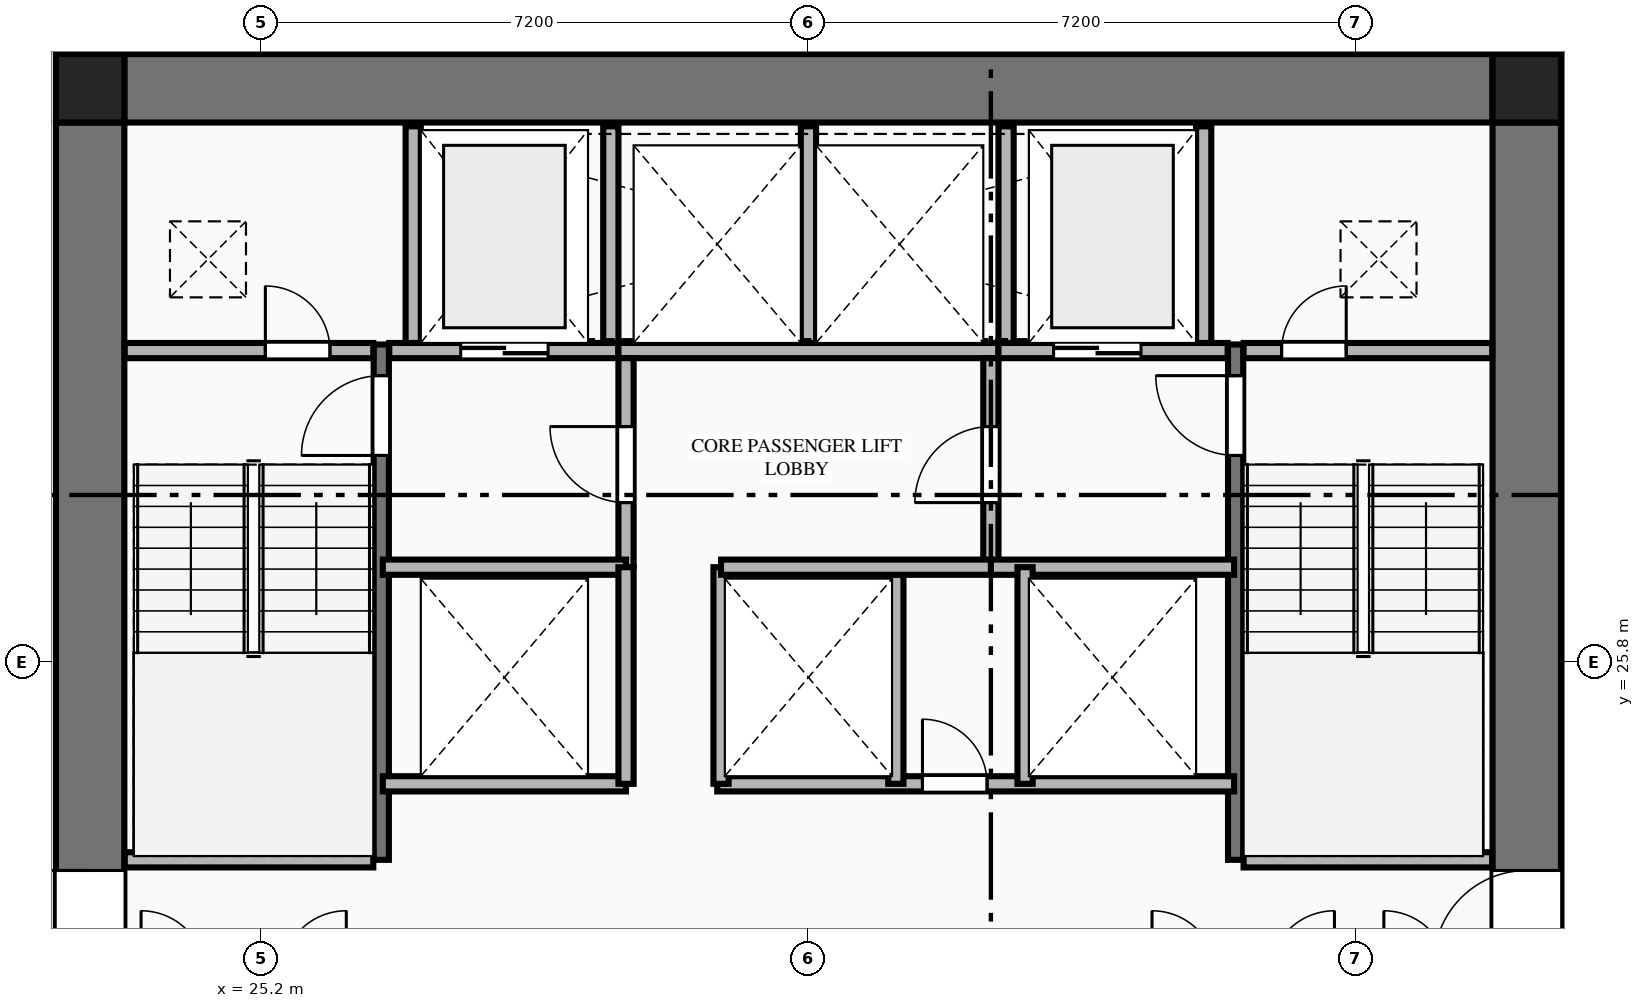
"""IFC4 building model, lengths in metres.
Left out: names, types, materials, properties, quantities, classifications, styles, units other than length and angle.
Written with IfcOpenShell. Run it as: python <this file> out.ifc"""

import sys

from ifc_helpers import new_model, si_unit, direction, frame, frame_2d, origin, origin_2d, place, context, subcontext, project, spatial, rectangle, extrude, element, fill, save


model = new_model("IFC4")
c1 = context("Model", 3, precision=1e-05, world=origin(), true_north=direction((0.0, 1.0)))
c2 = subcontext(c1, "Body", "Model", "MODEL_VIEW")
j1 = project(units=[si_unit("LENGTHUNIT", "METRE"), si_unit("PLANEANGLEUNIT", "RADIAN")], contexts=[c1])
p1 = place(None, origin())
s1 = spatial("IfcSite", under=j1, at=p1, CompositionType="ELEMENT")
p2 = place(p1, origin())
s2 = spatial("IfcBuilding", under=s1, at=p2, CompositionType="ELEMENT")
p3 = place(p2, frame((0.0, 0.0, 56.85)))
s3 = spatial("IfcBuildingStorey", under=s2, at=p3, CompositionType="ELEMENT", Elevation=56.85)
for number, where, z_axis, x_axis in (
    (1, (41.85, 33.35, 0.0), (0.0, 0.0, 1.0), (1.0, 0.0, 0.0)),
    (2, (22.95, 33.35, 0.0), (0.0, 0.0, 1.0), (1.0, 0.0, 0.0)),
):
    element("IfcColumn", number, at=place(p3, frame(where, z_axis=z_axis, x_axis=x_axis)), inside=s3, PredefinedType="COLUMN", context=c2, shape_type="SweptSolid", body=[
        extrude(rectangle(XDim=0.9, YDim=0.9, at=origin_2d()), origin(), (0.0, 0.0, 1.0), 3.55),
    ])
p4 = place(p3, frame((23.4, 33.35, 0.0), z_axis=(0.0, 0.0, 1.0), x_axis=(1.0, 0.0, 0.0)))
e3 = element("IfcWall", 3, at=p4, inside=s3, PredefinedType="SHEAR", context=c2, shape_type="SweptSolid", body=[
    extrude(rectangle(XDim=18.0, YDim=0.9, at=frame_2d((9.0, 0.0))), origin(), (0.0, 0.0, 1.0), 3.33),
])
p5 = place(p3, frame((22.95, 18.9, 0.0), z_axis=(0.0, 0.0, 1.0), x_axis=(0.0, 1.0, 0.0)))
e4 = element("IfcWall", 4, at=p5, inside=s3, PredefinedType="SHEAR", context=c2, shape_type="SweptSolid", body=[
    extrude(rectangle(XDim=14.0, YDim=0.9, at=frame_2d((7.0, 0.0))), origin(), (0.0, 0.0, 1.0), 3.33),
])
p6 = place(p5, frame((2.94, 0.0, 0.0)))
e5 = element("IfcOpeningElement", 5, at=p6, cuts=e4, PredefinedType="OPENING", context=c2, shape_type="SweptSolid", body=[
    extrude(rectangle(XDim=1.22, YDim=2.25, at=frame_2d((0.61, 1.125))), frame((0.0, 0.46, 0.0), z_axis=(0.0, -1.0, 0.0), x_axis=(1.0, 0.0, 0.0)), (0.0, 0.0, 1.0), 0.92),
])
p7 = place(p3, frame((41.85, 18.9, 0.0), z_axis=(0.0, 0.0, 1.0), x_axis=(0.0, 1.0, 0.0)))
e6 = element("IfcWall", 6, at=p7, inside=s3, PredefinedType="SHEAR", context=c2, shape_type="SweptSolid", body=[
    extrude(rectangle(XDim=14.0, YDim=0.9, at=frame_2d((7.0, 0.0))), origin(), (0.0, 0.0, 1.0), 3.33),
])
p8 = place(p7, frame((2.94, 0.0, 0.0)))
e7 = element("IfcOpeningElement", 7, at=p8, cuts=e6, PredefinedType="OPENING", context=c2, shape_type="SweptSolid", body=[
    extrude(rectangle(XDim=1.22, YDim=2.25, at=frame_2d((0.61, 1.125))), frame((0.0, 0.46, 0.0), z_axis=(0.0, -1.0, 0.0), x_axis=(1.0, 0.0, 0.0)), (0.0, 0.0, 1.0), 0.92),
])
p9 = place(p3, frame((26.78, 23.2, 0.0), z_axis=(0.0, 0.0, 1.0), x_axis=(0.0, 1.0, 0.0)))
e8 = element("IfcWall", 8, at=p9, inside=s3, PredefinedType="SHEAR", context=c2, shape_type="SweptSolid", body=[
    extrude(rectangle(XDim=6.78, YDim=0.2, at=frame_2d((3.39, 0.0))), origin(), (0.0, 0.0, 1.0), 3.55),
])
p10 = place(p9, frame((5.32, 0.0, 0.0)))
e9 = element("IfcOpeningElement", 9, at=p10, cuts=e8, PredefinedType="OPENING", context=c2, shape_type="SweptSolid", body=[
    extrude(rectangle(XDim=1.05, YDim=2.15, at=frame_2d((0.525, 1.075))), frame((0.0, 0.11, 0.0), z_axis=(0.0, -1.0, 0.0), x_axis=(1.0, 0.0, 0.0)), (0.0, 0.0, 1.0), 0.22),
])
p11 = place(p3, frame((23.405, 23.2, 0.0), z_axis=(0.0, 0.0, 1.0), x_axis=(1.0, 0.0, 0.0)))
e10 = element("IfcWall", 10, at=p11, inside=s3, PredefinedType="PLUMBINGWALL", context=c2, shape_type="SweptSolid", body=[
    extrude(rectangle(XDim=3.27, YDim=0.2, at=frame_2d((1.635, 0.0))), origin(), (0.0, 0.0, 1.0), 3.33),
])
p12 = place(p3, frame((38.02, 23.2, 0.0), z_axis=(0.0, 0.0, 1.0), x_axis=(0.0, 1.0, 0.0)))
e11 = element("IfcWall", 11, at=p12, inside=s3, PredefinedType="SHEAR", context=c2, shape_type="SweptSolid", body=[
    extrude(rectangle(XDim=6.78, YDim=0.2, at=frame_2d((3.39, 0.0))), origin(), (0.0, 0.0, 1.0), 3.55),
])
p13 = place(p12, frame((5.32, 0.0, 0.0)))
e12 = element("IfcOpeningElement", 12, at=p13, cuts=e11, PredefinedType="OPENING", context=c2, shape_type="SweptSolid", body=[
    extrude(rectangle(XDim=1.05, YDim=2.15, at=frame_2d((0.525, 1.075))), frame((0.0, 0.11, 0.0), z_axis=(0.0, -1.0, 0.0), x_axis=(1.0, 0.0, 0.0)), (0.0, 0.0, 1.0), 0.22),
])
p14 = place(p3, frame((38.125, 23.2, 0.0), z_axis=(0.0, 0.0, 1.0), x_axis=(1.0, 0.0, 0.0)))
e13 = element("IfcWall", 13, at=p14, inside=s3, PredefinedType="PLUMBINGWALL", context=c2, shape_type="SweptSolid", body=[
    extrude(rectangle(XDim=3.27, YDim=0.2, at=frame_2d((1.635, 0.0))), origin(), (0.0, 0.0, 1.0), 3.33),
])
p15 = place(p3, frame((23.405, 29.9, 0.0), z_axis=(0.0, 0.0, 1.0), x_axis=(1.0, 0.0, 0.0)))
e14 = element("IfcWall", 14, at=p15, inside=s3, PredefinedType="PLUMBINGWALL", context=c2, shape_type="SweptSolid", body=[
    extrude(rectangle(XDim=3.27, YDim=0.2, at=frame_2d((1.635, 0.0))), origin(), (0.0, 0.0, 1.0), 3.33),
])
p16 = place(p15, frame((1.85, 0.0, 0.0)))
e15 = element("IfcOpeningElement", 15, at=p16, cuts=e14, PredefinedType="OPENING", context=c2, shape_type="SweptSolid", body=[
    extrude(rectangle(XDim=0.85, YDim=2.05, at=frame_2d((0.425, 1.025))), frame((0.0, 0.11, 0.0), z_axis=(0.0, -1.0, 0.0), x_axis=(1.0, 0.0, 0.0)), (0.0, 0.0, 1.0), 0.22),
])
p17 = place(p3, frame((26.885, 29.9, 0.0), z_axis=(0.0, 0.0, 1.0), x_axis=(1.0, 0.0, 0.0)))
e16 = element("IfcWall", 16, at=p17, inside=s3, PredefinedType="PLUMBINGWALL", context=c2, shape_type="SweptSolid", body=[
    extrude(rectangle(XDim=3.015, YDim=0.2, at=frame_2d((1.507, 0.0))), origin(), (0.0, 0.0, 1.0), 3.33),
])
p18 = place(p17, frame((0.94, 0.0, 0.0)))
e17 = element("IfcOpeningElement", 17, at=p18, cuts=e16, PredefinedType="OPENING", context=c2, shape_type="SweptSolid", body=[
    extrude(rectangle(XDim=1.15, YDim=2.2, at=frame_2d((0.575, 1.1))), frame((0.0, 0.11, 0.0), z_axis=(0.0, -1.0, 0.0), x_axis=(1.0, 0.0, 0.0)), (0.0, 0.0, 1.0), 0.22),
])
p19 = place(p3, frame((29.9, 29.9, 0.0), z_axis=(0.0, 0.0, 1.0), x_axis=(1.0, 0.0, 0.0)))
e18 = element("IfcWall", 18, at=p19, inside=s3, PredefinedType="PLUMBINGWALL", context=c2, shape_type="SweptSolid", body=[
    extrude(rectangle(XDim=5.0, YDim=0.2, at=frame_2d((2.5, 0.0))), origin(), (0.0, 0.0, 1.0), 3.33),
])
p20 = place(p3, frame((34.9, 29.9, 0.0), z_axis=(0.0, 0.0, 1.0), x_axis=(1.0, 0.0, 0.0)))
e19 = element("IfcWall", 19, at=p20, inside=s3, PredefinedType="PLUMBINGWALL", context=c2, shape_type="SweptSolid", body=[
    extrude(rectangle(XDim=3.015, YDim=0.2, at=frame_2d((1.508, 0.0))), origin(), (0.0, 0.0, 1.0), 3.33),
])
p21 = place(p20, frame((0.725, 0.0, 0.0)))
e20 = element("IfcOpeningElement", 20, at=p21, cuts=e19, PredefinedType="OPENING", context=c2, shape_type="SweptSolid", body=[
    extrude(rectangle(XDim=1.15, YDim=2.2, at=frame_2d((0.575, 1.1))), frame((0.0, 0.11, 0.0), z_axis=(0.0, -1.0, 0.0), x_axis=(1.0, 0.0, 0.0)), (0.0, 0.0, 1.0), 0.22),
])
p22 = place(p3, frame((38.125, 29.9, 0.0), z_axis=(0.0, 0.0, 1.0), x_axis=(1.0, 0.0, 0.0)))
e21 = element("IfcWall", 21, at=p22, inside=s3, PredefinedType="PLUMBINGWALL", context=c2, shape_type="SweptSolid", body=[
    extrude(rectangle(XDim=3.27, YDim=0.2, at=frame_2d((1.635, 0.0))), origin(), (0.0, 0.0, 1.0), 3.33),
])
p23 = place(p22, frame((0.5, 0.0, 0.0)))
e22 = element("IfcOpeningElement", 22, at=p23, cuts=e21, PredefinedType="OPENING", context=c2, shape_type="SweptSolid", body=[
    extrude(rectangle(XDim=0.85, YDim=2.05, at=frame_2d((0.425, 1.025))), frame((0.0, 0.11, 0.0), z_axis=(0.0, -1.0, 0.0), x_axis=(1.0, 0.0, 0.0)), (0.0, 0.0, 1.0), 0.22),
])
for number, where, z_axis, x_axis in (
    (23, (27.2, 30.0, 0.0), (0.0, 0.0, 1.0), (0.0, 1.0, 0.0)),
    (24, (29.8, 30.0, 0.0), (0.0, 0.0, 1.0), (0.0, 1.0, 0.0)),
    (25, (32.4, 30.0, 0.0), (0.0, 0.0, 1.0), (0.0, 1.0, 0.0)),
    (26, (35.0, 30.0, 0.0), (0.0, 0.0, 1.0), (0.0, 1.0, 0.0)),
    (27, (37.6, 30.0, 0.0), (0.0, 0.0, 1.0), (0.0, 1.0, 0.0)),
):
    element("IfcWall", number, at=place(p3, frame(where, z_axis=z_axis, x_axis=x_axis)), inside=s3, PredefinedType="PLUMBINGWALL", context=c2, shape_type="SweptSolid", body=[
        extrude(rectangle(XDim=2.85, YDim=0.2, at=frame_2d((1.425, 0.0))), origin(), (0.0, 0.0, 1.0), 3.33),
    ])
p24 = place(p3, frame((30.0, 27.05, 0.0), z_axis=(0.0, 0.0, 1.0), x_axis=(0.0, 1.0, 0.0)))
e28 = element("IfcWall", 28, at=p24, inside=s3, PredefinedType="PLUMBINGWALL", context=c2, shape_type="SweptSolid", body=[
    extrude(rectangle(XDim=2.75, YDim=0.2, at=frame_2d((1.375, 0.0))), origin(), (0.0, 0.0, 1.0), 3.33),
])
p25 = place(p24, frame((0.85, 0.0, 0.0)))
e29 = element("IfcOpeningElement", 29, at=p25, cuts=e28, PredefinedType="OPENING", context=c2, shape_type="SweptSolid", body=[
    extrude(rectangle(XDim=1.0, YDim=2.15, at=frame_2d((0.5, 1.075))), frame((0.0, 0.11, 0.0), z_axis=(0.0, -1.0, 0.0), x_axis=(1.0, 0.0, 0.0)), (0.0, 0.0, 1.0), 0.22),
])
p26 = place(p3, frame((26.8, 27.05, 0.0), z_axis=(0.0, 0.0, 1.0), x_axis=(1.0, 0.0, 0.0)))
e30 = element("IfcWall", 30, at=p26, inside=s3, PredefinedType="PLUMBINGWALL", context=c2, shape_type="SweptSolid", body=[
    extrude(rectangle(XDim=3.2, YDim=0.2, at=frame_2d((1.6, 0.0))), origin(), (0.0, 0.0, 1.0), 3.33),
])
p27 = place(p3, frame((34.8, 27.05, 0.0), z_axis=(0.0, 0.0, 1.0), x_axis=(0.0, 1.0, 0.0)))
e31 = element("IfcWall", 31, at=p27, inside=s3, PredefinedType="PLUMBINGWALL", context=c2, shape_type="SweptSolid", body=[
    extrude(rectangle(XDim=2.75, YDim=0.2, at=frame_2d((1.375, 0.0))), origin(), (0.0, 0.0, 1.0), 3.33),
])
p28 = place(p27, frame((0.85, 0.0, 0.0)))
e32 = element("IfcOpeningElement", 32, at=p28, cuts=e31, PredefinedType="OPENING", context=c2, shape_type="SweptSolid", body=[
    extrude(rectangle(XDim=1.0, YDim=2.15, at=frame_2d((0.5, 1.075))), frame((0.0, 0.11, 0.0), z_axis=(0.0, -1.0, 0.0), x_axis=(1.0, 0.0, 0.0)), (0.0, 0.0, 1.0), 0.22),
])
for number, where, z_axis, x_axis in (
    (33, (34.8, 27.05, 0.0), (0.0, 0.0, 1.0), (1.0, 0.0, 0.0)),
    (34, (26.8, 24.2, 0.0), (0.0, 0.0, 1.0), (1.0, 0.0, 0.0)),
):
    element("IfcWall", number, at=place(p3, frame(where, z_axis=z_axis, x_axis=x_axis)), inside=s3, PredefinedType="PLUMBINGWALL", context=c2, shape_type="SweptSolid", body=[
        extrude(rectangle(XDim=3.2, YDim=0.2, at=frame_2d((1.6, 0.0))), origin(), (0.0, 0.0, 1.0), 3.33),
    ])
p29 = place(p3, frame((30.0, 24.2, 0.0), z_axis=(0.0, 0.0, 1.0), x_axis=(0.0, 1.0, 0.0)))
e35 = element("IfcWall", 35, at=p29, inside=s3, PredefinedType="PLUMBINGWALL", context=c2, shape_type="SweptSolid", body=[
    extrude(rectangle(XDim=2.85, YDim=0.2, at=frame_2d((1.425, 0.0))), origin(), (0.0, 0.0, 1.0), 3.33),
])
p30 = place(p3, frame((31.2, 24.2, 0.0), z_axis=(0.0, 0.0, 1.0), x_axis=(1.0, 0.0, 0.0)))
e36 = element("IfcWall", 36, at=p30, inside=s3, PredefinedType="PLUMBINGWALL", context=c2, shape_type="SweptSolid", body=[
    extrude(rectangle(XDim=6.8, YDim=0.2, at=frame_2d((3.4, 0.0))), origin(), (0.0, 0.0, 1.0), 3.33),
])
p31 = place(p30, frame((2.7, 0.0, 0.0)))
e37 = element("IfcOpeningElement", 37, at=p31, cuts=e36, PredefinedType="OPENING", context=c2, shape_type="SweptSolid", body=[
    extrude(rectangle(XDim=0.85, YDim=2.05, at=frame_2d((0.425, 1.025))), frame((0.0, 0.11, 0.0), z_axis=(0.0, -1.0, 0.0), x_axis=(1.0, 0.0, 0.0)), (0.0, 0.0, 1.0), 0.22),
])
for number, where, z_axis, x_axis in (
    (38, (31.25, 24.2, 0.0), (0.0, 0.0, 1.0), (0.0, 1.0, 0.0)),
    (39, (33.55, 24.2, 0.0), (0.0, 0.0, 1.0), (0.0, 1.0, 0.0)),
    (40, (35.25, 24.2, 0.0), (0.0, 0.0, 1.0), (0.0, 1.0, 0.0)),
):
    element("IfcWall", number, at=place(p3, frame(where, z_axis=z_axis, x_axis=x_axis)), inside=s3, PredefinedType="PLUMBINGWALL", context=c2, shape_type="SweptSolid", body=[
        extrude(rectangle(XDim=2.85, YDim=0.2, at=frame_2d((1.425, 0.0))), origin(), (0.0, 0.0, 1.0), 3.33),
    ])
p32 = place(p3, frame((31.25, 27.05, 0.0), z_axis=(0.0, 0.0, 1.0), x_axis=(1.0, 0.0, 0.0)))
e41 = element("IfcWall", 41, at=p32, inside=s3, PredefinedType="PLUMBINGWALL", context=c2, shape_type="SweptSolid", body=[
    extrude(rectangle(XDim=3.55, YDim=0.2, at=frame_2d((1.775, 0.0))), origin(), (0.0, 0.0, 1.0), 3.33),
])
p33 = place(p6, origin())
e42 = element("IfcDoor", 42, at=p33, inside=s3, OperationType="SINGLE_SWING_RIGHT", PredefinedType="DOOR", context=c2, shape_type="SweptSolid", body=[
    extrude(rectangle(XDim=1.22, YDim=2.25, at=frame_2d((0.61, 1.125))), frame((0.0, 0.025, 0.0), z_axis=(0.0, -1.0, 0.0), x_axis=(1.0, 0.0, 0.0)), (0.0, 0.0, 1.0), 0.05),
])
fill(e5, e42)
p34 = place(p8, origin())
e43 = element("IfcDoor", 43, at=p34, inside=s3, OperationType="SINGLE_SWING_LEFT", PredefinedType="DOOR", context=c2, shape_type="SweptSolid", body=[
    extrude(rectangle(XDim=1.22, YDim=2.25, at=frame_2d((0.61, 1.125))), frame((0.0, 0.025, 0.0), z_axis=(0.0, -1.0, 0.0), x_axis=(1.0, 0.0, 0.0)), (0.0, 0.0, 1.0), 0.05),
])
fill(e7, e43)
p35 = place(p10, origin())
e44 = element("IfcDoor", 44, at=p35, inside=s3, OperationType="SINGLE_SWING_LEFT", PredefinedType="DOOR", context=c2, shape_type="SweptSolid", body=[
    extrude(rectangle(XDim=1.05, YDim=2.15, at=frame_2d((0.525, 1.075))), frame((0.0, 0.025, 0.0), z_axis=(0.0, -1.0, 0.0), x_axis=(1.0, 0.0, 0.0)), (0.0, 0.0, 1.0), 0.05),
])
fill(e9, e44)
p36 = place(p13, origin())
e45 = element("IfcDoor", 45, at=p36, inside=s3, OperationType="SINGLE_SWING_RIGHT", PredefinedType="DOOR", context=c2, shape_type="SweptSolid", body=[
    extrude(rectangle(XDim=1.05, YDim=2.15, at=frame_2d((0.525, 1.075))), frame((0.0, 0.025, 0.0), z_axis=(0.0, -1.0, 0.0), x_axis=(1.0, 0.0, 0.0)), (0.0, 0.0, 1.0), 0.05),
])
fill(e12, e45)
p37 = place(p16, origin())
e46 = element("IfcDoor", 46, at=p37, inside=s3, OperationType="SINGLE_SWING_LEFT", PredefinedType="DOOR", context=c2, shape_type="SweptSolid", body=[
    extrude(rectangle(XDim=0.85, YDim=2.05, at=frame_2d((0.425, 1.025))), frame((0.0, 0.025, 0.0), z_axis=(0.0, -1.0, 0.0), x_axis=(1.0, 0.0, 0.0)), (0.0, 0.0, 1.0), 0.05),
])
fill(e15, e46)
p38 = place(p23, origin())
e47 = element("IfcDoor", 47, at=p38, inside=s3, OperationType="SINGLE_SWING_RIGHT", PredefinedType="DOOR", context=c2, shape_type="SweptSolid", body=[
    extrude(rectangle(XDim=0.85, YDim=2.05, at=frame_2d((0.425, 1.025))), frame((0.0, 0.025, 0.0), z_axis=(0.0, -1.0, 0.0), x_axis=(1.0, 0.0, 0.0)), (0.0, 0.0, 1.0), 0.05),
])
fill(e22, e47)
p39 = place(p18, origin())
e48 = element("IfcDoor", 48, at=p39, inside=s3, OperationType="DOUBLE_DOOR_SLIDING", PredefinedType="DOOR", context=c2, shape_type="SweptSolid", body=[
    extrude(rectangle(XDim=1.15, YDim=2.2, at=frame_2d((0.575, 1.1))), frame((0.0, 0.025, 0.0), z_axis=(0.0, -1.0, 0.0), x_axis=(1.0, 0.0, 0.0)), (0.0, 0.0, 1.0), 0.05),
])
fill(e17, e48)
p40 = place(p21, origin())
e49 = element("IfcDoor", 49, at=p40, inside=s3, OperationType="DOUBLE_DOOR_SLIDING", PredefinedType="DOOR", context=c2, shape_type="SweptSolid", body=[
    extrude(rectangle(XDim=1.15, YDim=2.2, at=frame_2d((0.575, 1.1))), frame((0.0, 0.025, 0.0), z_axis=(0.0, -1.0, 0.0), x_axis=(1.0, 0.0, 0.0)), (0.0, 0.0, 1.0), 0.05),
])
fill(e20, e49)
p41 = place(p25, origin())
e50 = element("IfcDoor", 50, at=p41, inside=s3, OperationType="SINGLE_SWING_RIGHT", PredefinedType="DOOR", context=c2, shape_type="SweptSolid", body=[
    extrude(rectangle(XDim=1.0, YDim=2.15, at=frame_2d((0.5, 1.075))), frame((0.0, 0.025, 0.0), z_axis=(0.0, -1.0, 0.0), x_axis=(1.0, 0.0, 0.0)), (0.0, 0.0, 1.0), 0.05),
])
fill(e29, e50)
p42 = place(p28, origin())
e51 = element("IfcDoor", 51, at=p42, inside=s3, OperationType="SINGLE_SWING_LEFT", PredefinedType="DOOR", context=c2, shape_type="SweptSolid", body=[
    extrude(rectangle(XDim=1.0, YDim=2.15, at=frame_2d((0.5, 1.075))), frame((0.0, 0.025, 0.0), z_axis=(0.0, -1.0, 0.0), x_axis=(1.0, 0.0, 0.0)), (0.0, 0.0, 1.0), 0.05),
])
fill(e32, e51)
p43 = place(p31, origin())
e52 = element("IfcDoor", 52, at=p43, inside=s3, OperationType="SINGLE_SWING_LEFT", PredefinedType="DOOR", context=c2, shape_type="SweptSolid", body=[
    extrude(rectangle(XDim=0.85, YDim=2.05, at=frame_2d((0.425, 1.025))), frame((0.0, 0.025, 0.0), z_axis=(0.0, -1.0, 0.0), x_axis=(1.0, 0.0, 0.0)), (0.0, 0.0, 1.0), 0.05),
])
fill(e37, e52)
save(model, sys.argv[1])
